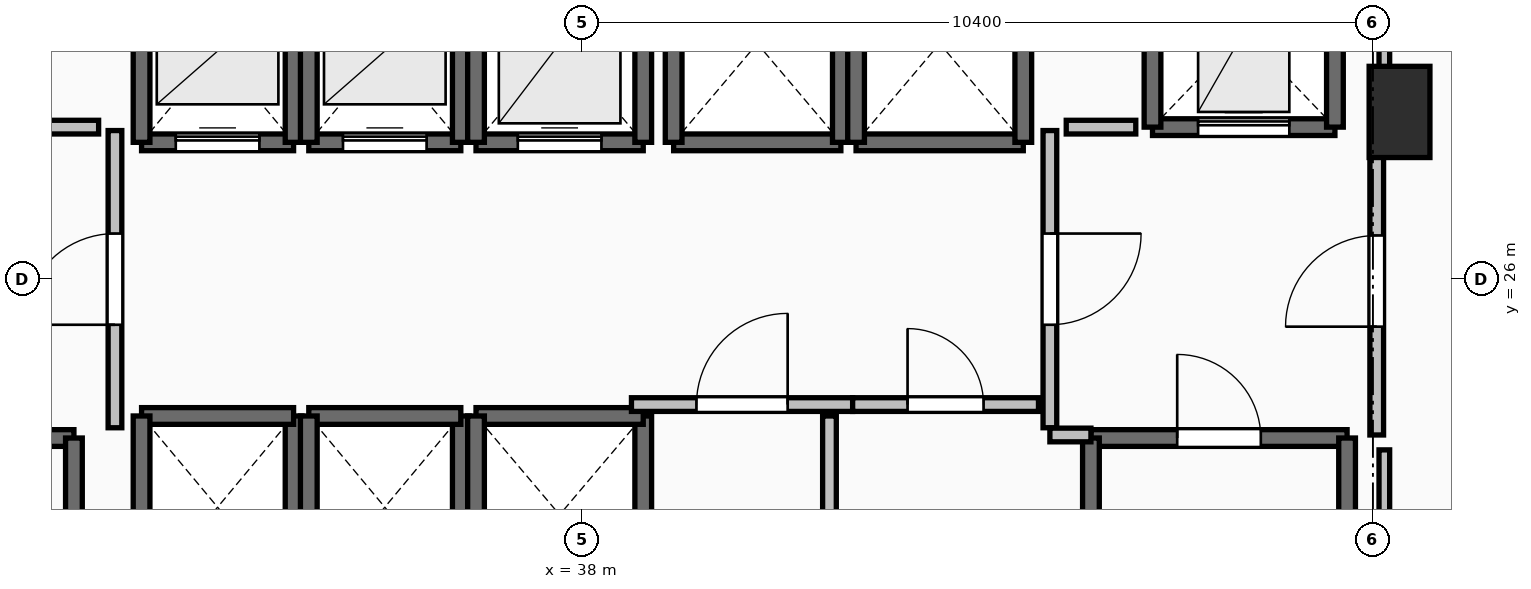
"""IFC4 building model, lengths in metres.
Left out: names, types, materials, properties, quantities, classifications, styles, units other than length and angle.
Written with IfcOpenShell. Run it as: python <this file> out.ifc"""

import sys

from ifc_helpers import new_model, si_unit, direction, frame, frame_2d, origin, origin_2d, place, context, subcontext, project, spatial, rectangle, extrude, element, fill, save


model = new_model("IFC4")
c1 = context("Model", 3, precision=1e-05, world=origin(), true_north=direction((0.0, 1.0)))
c2 = subcontext(c1, "Body", "Model", "MODEL_VIEW")
j1 = project(units=[si_unit("LENGTHUNIT", "METRE"), si_unit("PLANEANGLEUNIT", "RADIAN")], contexts=[c1])
p1 = place(None, origin())
s1 = spatial("IfcSite", under=j1, at=p1, CompositionType="ELEMENT")
p2 = place(p1, origin())
s2 = spatial("IfcBuilding", under=s1, at=p2, CompositionType="ELEMENT")
p3 = place(p2, frame((0.0, 0.0, 99.8)))
s3 = spatial("IfcBuildingStorey", under=s2, at=p3, CompositionType="ELEMENT", Elevation=99.8)
p4 = place(p3, frame((48.75, 28.2, 0.0), z_axis=(0.0, 0.0, 1.0), x_axis=(1.0, 0.0, 0.0)))
e1 = element("IfcColumn", 1, at=p4, inside=s3, PredefinedType="PILASTER", context=c2, shape_type="SweptSolid", body=[
    extrude(rectangle(XDim=0.8, YDim=1.2, at=origin_2d()), origin(), (0.0, 0.0, 1.0), 3.5),
])
p5 = place(p3, frame((27.94, 23.91, 0.0), z_axis=(0.0, 0.0, 1.0), x_axis=(1.0, 0.0, 0.0)))
e2 = element("IfcWall", 2, at=p5, inside=s3, PredefinedType="SOLIDWALL", context=c2, shape_type="SweptSolid", body=[
    extrude(rectangle(XDim=3.37, YDim=0.22, at=frame_2d((1.685, 0.0))), origin(), (0.0, 0.0, 1.0), 3.24),
])
p6 = place(p5, frame((1.135, 0.0, 0.0)))
e3 = element("IfcOpeningElement", 3, at=p6, cuts=e2, PredefinedType="OPENING", context=c2, shape_type="SweptSolid", body=[
    extrude(rectangle(XDim=1.1, YDim=2.15, at=frame_2d((0.55, 1.075))), frame((0.0, 0.125, 0.0), z_axis=(0.0, -1.0, 0.0), x_axis=(1.0, 0.0, 0.0)), (0.0, 0.0, 1.0), 0.25),
])
p7 = place(p3, frame((31.31, 23.91, 0.0), z_axis=(0.0, 0.0, 1.0), x_axis=(0.0, -1.0, 0.0)))
e4 = element("IfcWall", 4, at=p7, inside=s3, PredefinedType="SOLIDWALL", context=c2, shape_type="SweptSolid", body=[
    extrude(rectangle(XDim=7.42, YDim=0.22, at=frame_2d((3.71, 0.0))), origin(), (0.0, 0.0, 1.0), 3.24),
])
p8 = place(p3, frame((44.69, 23.91, 0.0), z_axis=(0.0, 0.0, 1.0), x_axis=(1.0, 0.0, 0.0)))
e5 = element("IfcWall", 5, at=p8, inside=s3, PredefinedType="SOLIDWALL", context=c2, shape_type="SweptSolid", body=[
    extrude(rectangle(XDim=3.37, YDim=0.22, at=frame_2d((1.685, 0.0))), origin(), (0.0, 0.0, 1.0), 3.24),
])
p9 = place(p8, frame((1.135, 0.0, 0.0)))
e6 = element("IfcOpeningElement", 6, at=p9, cuts=e5, PredefinedType="OPENING", context=c2, shape_type="SweptSolid", body=[
    extrude(rectangle(XDim=1.1, YDim=2.15, at=frame_2d((0.55, 1.075))), frame((0.0, 0.125, 0.0), z_axis=(0.0, -1.0, 0.0), x_axis=(1.0, 0.0, 0.0)), (0.0, 0.0, 1.0), 0.25),
])
for number, where, z_axis, x_axis in (
    (7, (48.06, 23.91, 0.0), (0.0, 0.0, 1.0), (0.0, -1.0, 0.0)),
    (8, (44.69, 16.49, 0.0), (0.0, 0.0, 1.0), (0.0, 1.0, 0.0)),
):
    element("IfcWall", number, at=place(p3, frame(where, z_axis=z_axis, x_axis=x_axis)), inside=s3, PredefinedType="SOLIDWALL", context=c2, shape_type="SweptSolid", body=[
        extrude(rectangle(XDim=7.42, YDim=0.22, at=frame_2d((3.71, 0.0))), origin(), (0.0, 0.0, 1.0), 3.24),
    ])
p10 = place(p3, frame((32.2, 27.8, 0.0), z_axis=(0.0, 0.0, 1.0), x_axis=(1.0, 0.0, 0.0)))
e9 = element("IfcWall", 9, at=p10, inside=s3, PredefinedType="SOLIDWALL", context=c2, shape_type="SweptSolid", body=[
    extrude(rectangle(XDim=2.0, YDim=0.22, at=frame_2d((1.0, 0.0))), origin(), (0.0, 0.0, 1.0), 3.24),
])
p11 = place(p10, frame((0.45, 0.0, 0.0)))
e10 = element("IfcOpeningElement", 10, at=p11, cuts=e9, PredefinedType="OPENING", context=c2, shape_type="SweptSolid", body=[
    extrude(rectangle(XDim=1.1, YDim=2.2, at=frame_2d((0.55, 1.1))), frame((0.0, 0.125, 0.0), z_axis=(0.0, -1.0, 0.0), x_axis=(1.0, 0.0, 0.0)), (0.0, 0.0, 1.0), 0.25),
])
for number, where, z_axis, x_axis in (
    (11, (34.2, 27.8, 0.0), (0.0, 0.0, 1.0), (0.0, 1.0, 0.0)),
    (12, (32.2, 30.2, 0.0), (0.0, 0.0, 1.0), (0.0, -1.0, 0.0)),
):
    element("IfcWall", number, at=place(p3, frame(where, z_axis=z_axis, x_axis=x_axis)), inside=s3, PredefinedType="SOLIDWALL", context=c2, shape_type="SweptSolid", body=[
        extrude(rectangle(XDim=2.4, YDim=0.22, at=frame_2d((1.2, 0.0))), origin(), (0.0, 0.0, 1.0), 3.24),
    ])
p12 = place(p3, frame((34.4, 27.8, 0.0), z_axis=(0.0, 0.0, 1.0), x_axis=(1.0, 0.0, 0.0)))
e13 = element("IfcWall", 13, at=p12, inside=s3, PredefinedType="SOLIDWALL", context=c2, shape_type="SweptSolid", body=[
    extrude(rectangle(XDim=2.0, YDim=0.22, at=frame_2d((1.0, 0.0))), origin(), (0.0, 0.0, 1.0), 3.24),
])
p13 = place(p12, frame((0.45, 0.0, 0.0)))
e14 = element("IfcOpeningElement", 14, at=p13, cuts=e13, PredefinedType="OPENING", context=c2, shape_type="SweptSolid", body=[
    extrude(rectangle(XDim=1.1, YDim=2.2, at=frame_2d((0.55, 1.1))), frame((0.0, 0.125, 0.0), z_axis=(0.0, -1.0, 0.0), x_axis=(1.0, 0.0, 0.0)), (0.0, 0.0, 1.0), 0.25),
])
for number, where, z_axis, x_axis in (
    (15, (36.4, 27.8, 0.0), (0.0, 0.0, 1.0), (0.0, 1.0, 0.0)),
    (16, (34.4, 30.2, 0.0), (0.0, 0.0, 1.0), (0.0, -1.0, 0.0)),
):
    element("IfcWall", number, at=place(p3, frame(where, z_axis=z_axis, x_axis=x_axis)), inside=s3, PredefinedType="SOLIDWALL", context=c2, shape_type="SweptSolid", body=[
        extrude(rectangle(XDim=2.4, YDim=0.22, at=frame_2d((1.2, 0.0))), origin(), (0.0, 0.0, 1.0), 3.24),
    ])
p14 = place(p3, frame((36.6, 27.8, 0.0), z_axis=(0.0, 0.0, 1.0), x_axis=(1.0, 0.0, 0.0)))
e17 = element("IfcWall", 17, at=p14, inside=s3, PredefinedType="SOLIDWALL", context=c2, shape_type="SweptSolid", body=[
    extrude(rectangle(XDim=2.2, YDim=0.22, at=frame_2d((1.1, 0.0))), origin(), (0.0, 0.0, 1.0), 3.24),
])
p15 = place(p14, frame((0.55, 0.0, 0.0)))
e18 = element("IfcOpeningElement", 18, at=p15, cuts=e17, PredefinedType="OPENING", context=c2, shape_type="SweptSolid", body=[
    extrude(rectangle(XDim=1.1, YDim=2.2, at=frame_2d((0.55, 1.1))), frame((0.0, 0.125, 0.0), z_axis=(0.0, -1.0, 0.0), x_axis=(1.0, 0.0, 0.0)), (0.0, 0.0, 1.0), 0.25),
])
for number, where, z_axis, x_axis in (
    (19, (38.8, 27.8, 0.0), (0.0, 0.0, 1.0), (0.0, 1.0, 0.0)),
    (20, (36.6, 30.4, 0.0), (0.0, 0.0, 1.0), (0.0, -1.0, 0.0)),
):
    element("IfcWall", number, at=place(p3, frame(where, z_axis=z_axis, x_axis=x_axis)), inside=s3, PredefinedType="SOLIDWALL", context=c2, shape_type="SweptSolid", body=[
        extrude(rectangle(XDim=2.6, YDim=0.22, at=frame_2d((1.3, 0.0))), origin(), (0.0, 0.0, 1.0), 3.24),
    ])
p16 = place(p3, frame((34.2, 21.8, 0.0), z_axis=(0.0, 0.0, 1.0), x_axis=(0.0, 1.0, 0.0)))
e21 = element("IfcWall", 21, at=p16, inside=s3, PredefinedType="SOLIDWALL", context=c2, shape_type="SweptSolid", body=[
    extrude(rectangle(XDim=2.4, YDim=0.22, at=frame_2d((1.2, 0.0))), origin(), (0.0, 0.0, 1.0), 3.24),
])
p17 = place(p3, frame((34.2, 24.2, 0.0), z_axis=(0.0, 0.0, 1.0), x_axis=(-1.0, 0.0, 0.0)))
e22 = element("IfcWall", 22, at=p17, inside=s3, PredefinedType="SOLIDWALL", context=c2, shape_type="SweptSolid", body=[
    extrude(rectangle(XDim=2.0, YDim=0.22, at=frame_2d((1.0, 0.0))), origin(), (0.0, 0.0, 1.0), 3.24),
])
for number, where, z_axis, x_axis in (
    (23, (32.2, 24.2, 0.0), (0.0, 0.0, 1.0), (0.0, -1.0, 0.0)),
    (24, (36.4, 21.8, 0.0), (0.0, 0.0, 1.0), (0.0, 1.0, 0.0)),
):
    element("IfcWall", number, at=place(p3, frame(where, z_axis=z_axis, x_axis=x_axis)), inside=s3, PredefinedType="SOLIDWALL", context=c2, shape_type="SweptSolid", body=[
        extrude(rectangle(XDim=2.4, YDim=0.22, at=frame_2d((1.2, 0.0))), origin(), (0.0, 0.0, 1.0), 3.24),
    ])
p18 = place(p3, frame((36.4, 24.2, 0.0), z_axis=(0.0, 0.0, 1.0), x_axis=(-1.0, 0.0, 0.0)))
e25 = element("IfcWall", 25, at=p18, inside=s3, PredefinedType="SOLIDWALL", context=c2, shape_type="SweptSolid", body=[
    extrude(rectangle(XDim=2.0, YDim=0.22, at=frame_2d((1.0, 0.0))), origin(), (0.0, 0.0, 1.0), 3.24),
])
p19 = place(p3, frame((34.4, 24.2, 0.0), z_axis=(0.0, 0.0, 1.0), x_axis=(0.0, -1.0, 0.0)))
e26 = element("IfcWall", 26, at=p19, inside=s3, PredefinedType="SOLIDWALL", context=c2, shape_type="SweptSolid", body=[
    extrude(rectangle(XDim=2.4, YDim=0.22, at=frame_2d((1.2, 0.0))), origin(), (0.0, 0.0, 1.0), 3.24),
])
p20 = place(p3, frame((38.8, 21.6, 0.0), z_axis=(0.0, 0.0, 1.0), x_axis=(0.0, 1.0, 0.0)))
e27 = element("IfcWall", 27, at=p20, inside=s3, PredefinedType="SOLIDWALL", context=c2, shape_type="SweptSolid", body=[
    extrude(rectangle(XDim=2.6, YDim=0.22, at=frame_2d((1.3, 0.0))), origin(), (0.0, 0.0, 1.0), 3.24),
])
p21 = place(p3, frame((38.8, 24.2, 0.0), z_axis=(0.0, 0.0, 1.0), x_axis=(-1.0, 0.0, 0.0)))
e28 = element("IfcWall", 28, at=p21, inside=s3, PredefinedType="SOLIDWALL", context=c2, shape_type="SweptSolid", body=[
    extrude(rectangle(XDim=2.2, YDim=0.22, at=frame_2d((1.1, 0.0))), origin(), (0.0, 0.0, 1.0), 3.24),
])
p22 = place(p3, frame((36.6, 24.2, 0.0), z_axis=(0.0, 0.0, 1.0), x_axis=(0.0, -1.0, 0.0)))
e29 = element("IfcWall", 29, at=p22, inside=s3, PredefinedType="SOLIDWALL", context=c2, shape_type="SweptSolid", body=[
    extrude(rectangle(XDim=2.6, YDim=0.22, at=frame_2d((1.3, 0.0))), origin(), (0.0, 0.0, 1.0), 3.24),
])
p23 = place(p3, frame((39.2, 27.8, 0.0), z_axis=(0.0, 0.0, 1.0), x_axis=(1.0, 0.0, 0.0)))
e30 = element("IfcWall", 30, at=p23, inside=s3, PredefinedType="SOLIDWALL", context=c2, shape_type="SweptSolid", body=[
    extrude(rectangle(XDim=2.2, YDim=0.22, at=frame_2d((1.1, 0.0))), origin(), (0.0, 0.0, 1.0), 3.24),
])
for number, where, z_axis, x_axis in (
    (31, (41.4, 27.8, 0.0), (0.0, 0.0, 1.0), (0.0, 1.0, 0.0)),
    (32, (39.2, 30.4, 0.0), (0.0, 0.0, 1.0), (0.0, -1.0, 0.0)),
):
    element("IfcWall", number, at=place(p3, frame(where, z_axis=z_axis, x_axis=x_axis)), inside=s3, PredefinedType="SOLIDWALL", context=c2, shape_type="SweptSolid", body=[
        extrude(rectangle(XDim=2.6, YDim=0.22, at=frame_2d((1.3, 0.0))), origin(), (0.0, 0.0, 1.0), 3.24),
    ])
p24 = place(p3, frame((41.6, 27.8, 0.0), z_axis=(0.0, 0.0, 1.0), x_axis=(1.0, 0.0, 0.0)))
e33 = element("IfcWall", 33, at=p24, inside=s3, PredefinedType="SOLIDWALL", context=c2, shape_type="SweptSolid", body=[
    extrude(rectangle(XDim=2.2, YDim=0.22, at=frame_2d((1.1, 0.0))), origin(), (0.0, 0.0, 1.0), 3.24),
])
for number, where, z_axis, x_axis in (
    (34, (43.8, 27.8, 0.0), (0.0, 0.0, 1.0), (0.0, 1.0, 0.0)),
    (35, (41.6, 30.4, 0.0), (0.0, 0.0, 1.0), (0.0, -1.0, 0.0)),
):
    element("IfcWall", number, at=place(p3, frame(where, z_axis=z_axis, x_axis=x_axis)), inside=s3, PredefinedType="SOLIDWALL", context=c2, shape_type="SweptSolid", body=[
        extrude(rectangle(XDim=2.6, YDim=0.22, at=frame_2d((1.3, 0.0))), origin(), (0.0, 0.0, 1.0), 3.24),
    ])
p25 = place(p3, frame((45.5, 28.0, 0.0), z_axis=(0.0, 0.0, 1.0), x_axis=(1.0, 0.0, 0.0)))
e36 = element("IfcWall", 36, at=p25, inside=s3, PredefinedType="SHEAR", context=c2, shape_type="SweptSolid", body=[
    extrude(rectangle(XDim=2.4, YDim=0.22, at=frame_2d((1.2, 0.0))), origin(), (0.0, 0.0, 1.0), 3.24),
])
p26 = place(p25, frame((0.6, 0.0, 0.0)))
e37 = element("IfcOpeningElement", 37, at=p26, cuts=e36, PredefinedType="OPENING", context=c2, shape_type="SweptSolid", body=[
    extrude(rectangle(XDim=1.2, YDim=2.2, at=frame_2d((0.6, 1.1))), frame((0.0, 0.125, 0.0), z_axis=(0.0, -1.0, 0.0), x_axis=(1.0, 0.0, 0.0)), (0.0, 0.0, 1.0), 0.25),
])
for number, where, z_axis, x_axis in (
    (38, (47.9, 28.0, 0.0), (0.0, 0.0, 1.0), (0.0, 1.0, 0.0)),
    (39, (45.5, 30.5, 0.0), (0.0, 0.0, 1.0), (0.0, -1.0, 0.0)),
):
    element("IfcWall", number, at=place(p3, frame(where, z_axis=z_axis, x_axis=x_axis)), inside=s3, PredefinedType="SHEAR", context=c2, shape_type="SweptSolid", body=[
        extrude(rectangle(XDim=2.5, YDim=0.22, at=frame_2d((1.25, 0.0))), origin(), (0.0, 0.0, 1.0), 3.24),
    ])
p27 = place(p3, frame((31.85, 24.045, 0.0), z_axis=(0.0, 0.0, 1.0), x_axis=(0.0, 1.0, 0.0)))
e40 = element("IfcWall", 40, at=p27, inside=s3, PredefinedType="PARTITIONING", context=c2, shape_type="SweptSolid", body=[
    extrude(rectangle(XDim=3.91, YDim=0.18, at=frame_2d((1.955, 0.0))), origin(), (0.0, 0.0, 1.0), 3.24),
])
p28 = place(p27, frame((1.355, 0.0, 0.0)))
e41 = element("IfcOpeningElement", 41, at=p28, cuts=e40, PredefinedType="OPENING", context=c2, shape_type="SweptSolid", body=[
    extrude(rectangle(XDim=1.2, YDim=2.15, at=frame_2d((0.6, 1.075))), frame((0.0, 0.105, 0.0), z_axis=(0.0, -1.0, 0.0), x_axis=(1.0, 0.0, 0.0)), (0.0, 0.0, 1.0), 0.21),
])
p29 = place(p3, frame((44.15, 27.955, 0.0), z_axis=(0.0, 0.0, 1.0), x_axis=(0.0, -1.0, 0.0)))
e42 = element("IfcWall", 42, at=p29, inside=s3, PredefinedType="PARTITIONING", context=c2, shape_type="SweptSolid", body=[
    extrude(rectangle(XDim=3.91, YDim=0.18, at=frame_2d((1.955, 0.0))), origin(), (0.0, 0.0, 1.0), 3.24),
])
p30 = place(p29, frame((1.355, 0.0, 0.0)))
e43 = element("IfcOpeningElement", 43, at=p30, cuts=e42, PredefinedType="OPENING", context=c2, shape_type="SweptSolid", body=[
    extrude(rectangle(XDim=1.2, YDim=2.15, at=frame_2d((0.6, 1.075))), frame((0.0, 0.105, 0.0), z_axis=(0.0, -1.0, 0.0), x_axis=(1.0, 0.0, 0.0)), (0.0, 0.0, 1.0), 0.21),
])
p31 = place(p3, frame((44.15, 23.95, 0.0), z_axis=(0.0, 0.0, 1.0), x_axis=(1.0, 0.0, 0.0)))
e44 = element("IfcWall", 44, at=p31, inside=s3, PredefinedType="PARTITIONING", context=c2, shape_type="SweptSolid", body=[
    extrude(rectangle(XDim=0.54, YDim=0.18, at=frame_2d((0.27, 0.0))), origin(), (0.0, 0.0, 1.0), 3.24),
])
p32 = place(p3, frame((48.45, 23.95, 0.0), z_axis=(0.0, 0.0, 1.0), x_axis=(0.0, 1.0, 0.0)))
e45 = element("IfcWall", 45, at=p32, inside=s3, PredefinedType="PARTITIONING", context=c2, shape_type="SweptSolid", body=[
    extrude(rectangle(XDim=4.05, YDim=0.18, at=frame_2d((2.025, 0.0))), origin(), (0.0, 0.0, 1.0), 3.24),
])
p33 = place(p32, frame((1.425, 0.0, 0.0)))
e46 = element("IfcOpeningElement", 46, at=p33, cuts=e45, PredefinedType="OPENING", context=c2, shape_type="SweptSolid", body=[
    extrude(rectangle(XDim=1.2, YDim=2.15, at=frame_2d((0.6, 1.075))), frame((0.0, 0.105, 0.0), z_axis=(0.0, -1.0, 0.0), x_axis=(1.0, 0.0, 0.0)), (0.0, 0.0, 1.0), 0.21),
])
p34 = place(p3, frame((38.645, 24.35, 0.0), z_axis=(0.0, 0.0, 1.0), x_axis=(1.0, 0.0, 0.0)))
e47 = element("IfcWall", 47, at=p34, inside=s3, PredefinedType="PARTITIONING", context=c2, shape_type="SweptSolid", body=[
    extrude(rectangle(XDim=2.91, YDim=0.18, at=frame_2d((1.455, 0.0))), origin(), (0.0, 0.0, 1.0), 3.24),
])
p35 = place(p34, frame((0.855, 0.0, 0.0)))
e48 = element("IfcOpeningElement", 48, at=p35, cuts=e47, PredefinedType="OPENING", context=c2, shape_type="SweptSolid", body=[
    extrude(rectangle(XDim=1.2, YDim=2.15, at=frame_2d((0.6, 1.075))), frame((0.0, 0.105, 0.0), z_axis=(0.0, -1.0, 0.0), x_axis=(1.0, 0.0, 0.0)), (0.0, 0.0, 1.0), 0.21),
])
p36 = place(p3, frame((41.555, 24.35, 0.0), z_axis=(0.0, 0.0, 1.0), x_axis=(1.0, 0.0, 0.0)))
e49 = element("IfcWall", 49, at=p36, inside=s3, PredefinedType="PARTITIONING", context=c2, shape_type="SweptSolid", body=[
    extrude(rectangle(XDim=2.445, YDim=0.18, at=frame_2d((1.223, 0.0))), origin(), (0.0, 0.0, 1.0), 3.24),
])
p37 = place(p36, frame((0.722, 0.0, 0.0)))
e50 = element("IfcOpeningElement", 50, at=p37, cuts=e49, PredefinedType="OPENING", context=c2, shape_type="SweptSolid", body=[
    extrude(rectangle(XDim=1.0, YDim=2.15, at=frame_2d((0.5, 1.075))), frame((0.0, 0.105, 0.0), z_axis=(0.0, -1.0, 0.0), x_axis=(1.0, 0.0, 0.0)), (0.0, 0.0, 1.0), 0.21),
])
p38 = place(p3, frame((41.25, 20.305, 0.0), z_axis=(0.0, 0.0, 1.0), x_axis=(0.0, 1.0, 0.0)))
e51 = element("IfcWall", 51, at=p38, inside=s3, PredefinedType="PARTITIONING", context=c2, shape_type="SweptSolid", body=[
    extrude(rectangle(XDim=3.895, YDim=0.18, at=frame_2d((1.948, 0.0))), origin(), (0.0, 0.0, 1.0), 3.24),
])
p39 = place(p38, frame((1.448, 0.0, 0.0)))
e52 = element("IfcOpeningElement", 52, at=p39, cuts=e51, PredefinedType="OPENING", context=c2, shape_type="SweptSolid", body=[
    extrude(rectangle(XDim=1.0, YDim=2.15, at=frame_2d((0.5, 1.075))), frame((0.0, 0.105, 0.0), z_axis=(0.0, -1.0, 0.0), x_axis=(1.0, 0.0, 0.0)), (0.0, 0.0, 1.0), 0.21),
])
for number, where, z_axis, x_axis in (
    (53, (31.635, 28.0, 0.0), (0.0, 0.0, 1.0), (-1.0, 0.0, 0.0)),
    (54, (45.28, 28.0, 0.0), (0.0, 0.0, 1.0), (-1.0, 0.0, 0.0)),
):
    element("IfcWall", number, at=place(p3, frame(where, z_axis=z_axis, x_axis=x_axis)), inside=s3, PredefinedType="PARTITIONING", context=c2, shape_type="SweptSolid", body=[
        extrude(rectangle(XDim=0.915, YDim=0.18, at=frame_2d((0.458, 0.0))), origin(), (0.0, 0.0, 1.0), 3.24),
    ])
p40 = place(p3, frame((48.55, 33.45, 0.0), z_axis=(0.0, 0.0, 1.0), x_axis=(0.0, -1.0, 0.0)))
e55 = element("IfcWall", 55, at=p40, inside=s3, PredefinedType="PARTITIONING", context=c2, shape_type="SweptSolid", body=[
    extrude(rectangle(XDim=5.254, YDim=0.14, at=frame_2d((2.627, 0.0))), origin(), (0.0, 0.0, 1.0), 2.432),
])
p41 = place(p3, frame((48.55, 23.754, 0.0), z_axis=(0.0, 0.0, 1.0), x_axis=(0.0, -1.0, 0.0)))
e56 = element("IfcWall", 56, at=p41, inside=s3, PredefinedType="PARTITIONING", context=c2, shape_type="SweptSolid", body=[
    extrude(rectangle(XDim=7.514, YDim=0.14, at=frame_2d((3.757, 0.0))), origin(), (0.0, 0.0, 1.0), 2.432),
])
p42 = place(p9, origin())
e57 = element("IfcDoor", 57, at=p42, inside=s3, OperationType="SINGLE_SWING_LEFT", PredefinedType="DOOR", context=c2, shape_type="SweptSolid", body=[
    extrude(rectangle(XDim=1.1, YDim=2.15, at=frame_2d((0.55, 1.075))), frame((0.0, 0.025, 0.0), z_axis=(0.0, -1.0, 0.0), x_axis=(1.0, 0.0, 0.0)), (0.0, 0.0, 1.0), 0.05),
])
fill(e6, e57)
p43 = place(p11, origin())
e58 = element("IfcDoor", 58, at=p43, inside=s3, OperationType="SLIDING_TO_LEFT", PredefinedType="DOOR", context=c2, shape_type="SweptSolid", body=[
    extrude(rectangle(XDim=1.1, YDim=2.2, at=frame_2d((0.55, 1.1))), frame((0.0, 0.025, 0.0), z_axis=(0.0, -1.0, 0.0), x_axis=(1.0, 0.0, 0.0)), (0.0, 0.0, 1.0), 0.05),
])
fill(e10, e58)
p44 = place(p13, origin())
e59 = element("IfcDoor", 59, at=p44, inside=s3, OperationType="SLIDING_TO_LEFT", PredefinedType="DOOR", context=c2, shape_type="SweptSolid", body=[
    extrude(rectangle(XDim=1.1, YDim=2.2, at=frame_2d((0.55, 1.1))), frame((0.0, 0.025, 0.0), z_axis=(0.0, -1.0, 0.0), x_axis=(1.0, 0.0, 0.0)), (0.0, 0.0, 1.0), 0.05),
])
fill(e14, e59)
p45 = place(p15, origin())
e60 = element("IfcDoor", 60, at=p45, inside=s3, OperationType="SLIDING_TO_LEFT", PredefinedType="DOOR", context=c2, shape_type="SweptSolid", body=[
    extrude(rectangle(XDim=1.1, YDim=2.2, at=frame_2d((0.55, 1.1))), frame((0.0, 0.025, 0.0), z_axis=(0.0, -1.0, 0.0), x_axis=(1.0, 0.0, 0.0)), (0.0, 0.0, 1.0), 0.05),
])
fill(e18, e60)
p46 = place(p26, origin())
e61 = element("IfcDoor", 61, at=p46, inside=s3, OperationType="SLIDING_TO_LEFT", PredefinedType="DOOR", context=c2, shape_type="SweptSolid", body=[
    extrude(rectangle(XDim=1.2, YDim=2.2, at=frame_2d((0.6, 1.1))), frame((0.0, 0.025, 0.0), z_axis=(0.0, -1.0, 0.0), x_axis=(1.0, 0.0, 0.0)), (0.0, 0.0, 1.0), 0.05),
])
fill(e37, e61)
p47 = place(p28, origin())
e62 = element("IfcDoor", 62, at=p47, inside=s3, OperationType="SINGLE_SWING_LEFT", PredefinedType="DOOR", context=c2, shape_type="SweptSolid", body=[
    extrude(rectangle(XDim=1.2, YDim=2.15, at=frame_2d((0.6, 1.075))), frame((0.0, 0.025, 0.0), z_axis=(0.0, -1.0, 0.0), x_axis=(1.0, 0.0, 0.0)), (0.0, 0.0, 1.0), 0.05),
])
fill(e41, e62)
p48 = place(p30, origin())
e63 = element("IfcDoor", 63, at=p48, inside=s3, OperationType="SINGLE_SWING_LEFT", PredefinedType="DOOR", context=c2, shape_type="SweptSolid", body=[
    extrude(rectangle(XDim=1.2, YDim=2.15, at=frame_2d((0.6, 1.075))), frame((0.0, 0.025, 0.0), z_axis=(0.0, -1.0, 0.0), x_axis=(1.0, 0.0, 0.0)), (0.0, 0.0, 1.0), 0.05),
])
fill(e43, e63)
p49 = place(p33, origin())
e64 = element("IfcDoor", 64, at=p49, inside=s3, OperationType="SINGLE_SWING_LEFT", PredefinedType="DOOR", context=c2, shape_type="SweptSolid", body=[
    extrude(rectangle(XDim=1.2, YDim=2.15, at=frame_2d((0.6, 1.075))), frame((0.0, 0.025, 0.0), z_axis=(0.0, -1.0, 0.0), x_axis=(1.0, 0.0, 0.0)), (0.0, 0.0, 1.0), 0.05),
])
fill(e46, e64)
p50 = place(p35, origin())
e65 = element("IfcDoor", 65, at=p50, inside=s3, OperationType="SINGLE_SWING_RIGHT", PredefinedType="DOOR", context=c2, shape_type="SweptSolid", body=[
    extrude(rectangle(XDim=1.2, YDim=2.15, at=frame_2d((0.6, 1.075))), frame((0.0, 0.025, 0.0), z_axis=(0.0, -1.0, 0.0), x_axis=(1.0, 0.0, 0.0)), (0.0, 0.0, 1.0), 0.05),
])
fill(e48, e65)
p51 = place(p37, origin())
e66 = element("IfcDoor", 66, at=p51, inside=s3, OperationType="SINGLE_SWING_LEFT", PredefinedType="DOOR", context=c2, shape_type="SweptSolid", body=[
    extrude(rectangle(XDim=1.0, YDim=2.15, at=frame_2d((0.5, 1.075))), frame((0.0, 0.025, 0.0), z_axis=(0.0, -1.0, 0.0), x_axis=(1.0, 0.0, 0.0)), (0.0, 0.0, 1.0), 0.05),
])
fill(e50, e66)
save(model, sys.argv[1])
